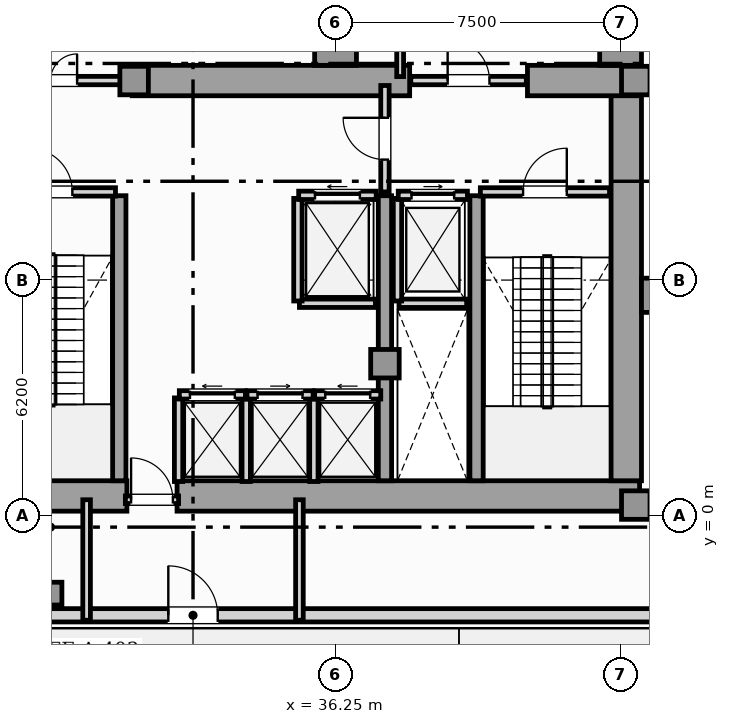
"""IFC4 building model, lengths in metres.
Left out: names, types, materials, properties, quantities, classifications, styles, units other than length and angle.
Written with IfcOpenShell. Run it as: python <this file> out.ifc"""

import sys

from ifc_helpers import new_model, si_unit, direction, frame, frame_2d, origin, origin_2d, place, context, subcontext, project, spatial, rectangle, hollow_rectangle, extrude, element, fill, save


model = new_model("IFC4")
c1 = context("Model", 3, precision=1e-05, world=origin(), true_north=direction((0.0, 1.0)))
c2 = subcontext(c1, "Body", "Model", "MODEL_VIEW")
j1 = project(units=[si_unit("LENGTHUNIT", "METRE"), si_unit("PLANEANGLEUNIT", "RADIAN")], contexts=[c1])
p1 = place(None, origin())
s1 = spatial("IfcSite", under=j1, at=p1, CompositionType="ELEMENT")
p2 = place(p1, origin())
s2 = spatial("IfcBuilding", under=s1, at=p2, CompositionType="ELEMENT")
p3 = place(p2, origin())
s3 = spatial("IfcBuildingStorey", under=s2, at=p3, CompositionType="ELEMENT", Elevation=0.0)
p4 = place(p3, frame((13.25, 0.52, 0.0), z_axis=(0.0, 0.0, 1.0), x_axis=(1.0, 0.0, 0.0)))
e1 = element("IfcWall", 1, at=p4, inside=s3, PredefinedType="SHEAR", context=c2, shape_type="SweptSolid", body=[
    extrude(rectangle(XDim=17.51, YDim=0.8, at=frame_2d((8.755, 0.0))), origin(), (0.0, 0.0, 1.0), 5.1),
])
p5 = place(p3, frame((32.08, 0.52, 0.0), z_axis=(0.0, 0.0, 1.0), x_axis=(1.0, 0.0, 0.0)))
e2 = element("IfcWall", 2, at=p5, inside=s3, PredefinedType="SHEAR", context=c2, shape_type="SweptSolid", body=[
    extrude(rectangle(XDim=12.17, YDim=0.8, at=frame_2d((6.085, 0.0))), origin(), (0.0, 0.0, 1.0), 5.1),
])
p6 = place(p3, frame((43.9, 0.92, 0.0), z_axis=(0.0, 0.0, 1.0), x_axis=(0.0, 1.0, 0.0)))
e3 = element("IfcWall", 3, at=p6, inside=s3, PredefinedType="SHEAR", context=c2, shape_type="SweptSolid", body=[
    extrude(rectangle(XDim=10.53, YDim=0.8, at=frame_2d((5.265, 0.0))), origin(), (0.0, 0.0, 1.0), 5.1),
])
p7 = place(p3, frame((30.9, 11.45, 0.0), z_axis=(0.0, 0.0, 1.0), x_axis=(1.0, 0.0, 0.0)))
e4 = element("IfcWall", 4, at=p7, inside=s3, PredefinedType="SHEAR", context=c2, shape_type="SweptSolid", body=[
    extrude(rectangle(XDim=7.3, YDim=0.8, at=frame_2d((3.65, 0.0))), origin(), (0.0, 0.0, 1.0), 5.1),
])
p8 = place(p3, frame((41.3, 11.45, 0.0), z_axis=(0.0, 0.0, 1.0), x_axis=(1.0, 0.0, 0.0)))
e5 = element("IfcWall", 5, at=p8, inside=s3, PredefinedType="SHEAR", context=c2, shape_type="SweptSolid", body=[
    extrude(rectangle(XDim=2.95, YDim=0.8, at=frame_2d((1.475, 0.0))), origin(), (0.0, 0.0, 1.0), 5.1),
])
for number, where, z_axis, x_axis in (
    (6, (30.56, 0.92, 0.0), (0.0, 0.0, 1.0), (0.0, 1.0, 0.0)),
    (7, (37.55, 0.92, 0.0), (0.0, 0.0, 1.0), (0.0, 1.0, 0.0)),
    (8, (39.96, 0.92, 0.0), (0.0, 0.0, 1.0), (0.0, 1.0, 0.0)),
):
    element("IfcWall", number, at=place(p3, frame(where, z_axis=z_axis, x_axis=x_axis)), inside=s3, PredefinedType="SHEAR", context=c2, shape_type="SweptSolid", body=[
        extrude(rectangle(XDim=7.5, YDim=0.35, at=frame_2d((3.75, 0.0))), origin(), (0.0, 0.0, 1.0), 5.1),
    ])
p9 = place(p3, frame((44.6, 5.8, 0.0), z_axis=(0.0, 0.0, 1.0), x_axis=(1.0, 0.0, 0.0)))
e9 = element("IfcColumn", 9, at=p9, inside=s3, PredefinedType="PILASTER", context=c2, shape_type="SweptSolid", body=[
    extrude(rectangle(XDim=0.6, YDim=0.9, at=origin_2d()), origin(), (0.0, 0.0, 1.0), 5.4),
])
for number, where, z_axis, x_axis in (
    (10, (44.15, 0.28, 0.0), (0.0, 0.0, 1.0), (1.0, 0.0, 0.0)),
    (11, (44.15, 11.45, 0.0), (0.0, 0.0, 1.0), (1.0, 0.0, 0.0)),
    (12, (37.55, 4.0, 0.0), (0.0, 0.0, 1.0), (1.0, 0.0, 0.0)),
    (13, (30.95, 11.45, 0.0), (0.0, 0.0, 1.0), (1.0, 0.0, 0.0)),
):
    element("IfcColumn", number, at=place(p3, frame(where, z_axis=z_axis, x_axis=x_axis)), inside=s3, PredefinedType="COLUMN", context=c2, shape_type="SweptSolid", body=[
        extrude(rectangle(XDim=0.75, YDim=0.75, at=origin_2d()), origin(), (0.0, 0.0, 1.0), 5.4),
    ])
for number, where, z_axis, x_axis in (
    (14, (43.75, 12.4, 0.0), (0.0, 0.0, 1.0), (1.0, 0.0, 0.0)),
    (15, (36.25, 12.4, 0.0), (0.0, 0.0, 1.0), (1.0, 0.0, 0.0)),
):
    element("IfcColumn", number, at=place(p3, frame(where, z_axis=z_axis, x_axis=x_axis)), inside=s3, PredefinedType="COLUMN", context=c2, shape_type="SweptSolid", body=[
        extrude(rectangle(XDim=1.1, YDim=1.1, at=origin_2d()), origin(), (0.0, 0.0, 1.0), 5.4),
    ])
p10 = place(p3, frame((28.75, -2.05, 0.0), z_axis=(0.0, 0.0, 1.0), x_axis=(1.0, 0.0, 0.0)))
e16 = element("IfcColumn", 16, at=p10, inside=s3, PredefinedType="COLUMN", context=c2, shape_type="SweptSolid", body=[
    extrude(hollow_rectangle(XDim=0.6, YDim=0.6, WallThickness=0.04, at=origin_2d()), origin(), (0.0, 0.0, 1.0), 5.4),
])
p11 = place(p3, frame((-8.06, -2.62, 0.0), z_axis=(0.0, 0.0, 1.0), x_axis=(1.0, 0.0, 0.0)))
e17 = element("IfcWall", 17, at=p11, inside=s3, PredefinedType="SOLIDWALL", context=c2, shape_type="SweptSolid", body=[
    extrude(rectangle(XDim=71.97, YDim=0.35, at=frame_2d((35.985, 0.0))), origin(), (0.0, 0.0, 1.0), 5.1),
])
p12 = place(p11, frame((18.06, 0.0, 0.0)))
e18 = element("IfcOpeningElement", 18, at=p12, cuts=e17, PredefinedType="OPENING", context=c2, shape_type="SweptSolid", body=[
    extrude(rectangle(XDim=1.3, YDim=2.2, at=frame_2d((0.65, 1.1))), frame((0.0, 0.185, 0.0), z_axis=(0.0, -1.0, 0.0), x_axis=(1.0, 0.0, 0.0)), (0.0, 0.0, 1.0), 0.37),
])
p13 = place(p11, frame((39.91, 0.0, 0.0)))
e19 = element("IfcOpeningElement", 19, at=p13, cuts=e17, PredefinedType="OPENING", context=c2, shape_type="SweptSolid", body=[
    extrude(rectangle(XDim=1.3, YDim=2.2, at=frame_2d((0.65, 1.1))), frame((0.0, 0.185, 0.0), z_axis=(0.0, -1.0, 0.0), x_axis=(1.0, 0.0, 0.0)), (0.0, 0.0, 1.0), 0.37),
])
p14 = place(p11, frame((54.26, 0.0, 0.0)))
e20 = element("IfcOpeningElement", 20, at=p14, cuts=e17, PredefinedType="OPENING", context=c2, shape_type="SweptSolid", body=[
    extrude(rectangle(XDim=1.3, YDim=2.2, at=frame_2d((0.65, 1.1))), frame((0.0, 0.185, 0.0), z_axis=(0.0, -1.0, 0.0), x_axis=(1.0, 0.0, 0.0)), (0.0, 0.0, 1.0), 0.37),
])
p15 = place(p11, frame((66.76, 0.0, 0.0)))
e21 = element("IfcOpeningElement", 21, at=p15, cuts=e17, PredefinedType="OPENING", context=c2, shape_type="SweptSolid", body=[
    extrude(rectangle(XDim=3.6, YDim=3.2, at=frame_2d((1.8, 1.6))), frame((0.0, 0.185, 0.0), z_axis=(0.0, -1.0, 0.0), x_axis=(1.0, 0.0, 0.0)), (0.0, 0.0, 1.0), 0.37),
])
p16 = place(p11, frame((64.92, 0.0, 0.0)))
e22 = element("IfcOpeningElement", 22, at=p16, cuts=e17, PredefinedType="OPENING", context=c2, shape_type="SweptSolid", body=[
    extrude(rectangle(XDim=1.08, YDim=2.25, at=frame_2d((0.54, 1.125))), frame((0.0, 0.185, 0.0), z_axis=(0.0, -1.0, 0.0), x_axis=(1.0, 0.0, 0.0)), (0.0, 0.0, 1.0), 0.37),
])
p17 = place(p3, frame((37.92, 5.59, 0.0), z_axis=(0.0, 0.0, 1.0), x_axis=(1.0, 0.0, 0.0)))
e23 = element("IfcWall", 23, at=p17, inside=s3, PredefinedType="SOLIDWALL", context=c2, shape_type="SweptSolid", body=[
    extrude(rectangle(XDim=1.78, YDim=0.22, at=frame_2d((0.89, 0.0))), origin(), (0.0, 0.0, 1.0), 5.1),
])
p18 = place(p3, frame((37.88, 5.65, 0.0), z_axis=(0.0, 0.0, 1.0), x_axis=(0.0, 1.0, 0.0)))
e24 = element("IfcWall", 24, at=p18, inside=s3, PredefinedType="SOLIDWALL", context=c2, shape_type="SweptSolid", body=[
    extrude(rectangle(XDim=2.7, YDim=0.22, at=frame_2d((1.35, 0.0))), origin(), (0.0, 0.0, 1.0), 5.1),
])
p19 = place(p3, frame((37.9, 8.43, 0.0), z_axis=(0.0, 0.0, 1.0), x_axis=(1.0, 0.0, 0.0)))
e25 = element("IfcWall", 25, at=p19, inside=s3, PredefinedType="SOLIDWALL", context=c2, shape_type="SweptSolid", body=[
    extrude(rectangle(XDim=1.82, YDim=0.22, at=frame_2d((0.91, 0.0))), origin(), (0.0, 0.0, 1.0), 5.1),
])
p20 = place(p19, frame((0.35, 0.0, 0.0)))
e26 = element("IfcOpeningElement", 26, at=p20, cuts=e25, PredefinedType="OPENING", context=c2, shape_type="SweptSolid", body=[
    extrude(rectangle(XDim=1.12, YDim=2.25, at=frame_2d((0.56, 1.125))), frame((0.0, 0.12, 0.0), z_axis=(0.0, -1.0, 0.0), x_axis=(1.0, 0.0, 0.0)), (0.0, 0.0, 1.0), 0.24),
])
p21 = place(p3, frame((35.3, 5.59, 0.0), z_axis=(0.0, 0.0, 1.0), x_axis=(1.0, 0.0, 0.0)))
e27 = element("IfcWall", 27, at=p21, inside=s3, PredefinedType="SOLIDWALL", context=c2, shape_type="SweptSolid", body=[
    extrude(rectangle(XDim=2.0, YDim=0.22, at=frame_2d((1.0, 0.0))), origin(), (0.0, 0.0, 1.0), 5.1),
])
p22 = place(p3, frame((35.26, 5.65, 0.0), z_axis=(0.0, 0.0, 1.0), x_axis=(0.0, 1.0, 0.0)))
e28 = element("IfcWall", 28, at=p22, inside=s3, PredefinedType="SOLIDWALL", context=c2, shape_type="SweptSolid", body=[
    extrude(rectangle(XDim=2.7, YDim=0.22, at=frame_2d((1.35, 0.0))), origin(), (0.0, 0.0, 1.0), 5.1),
])
p23 = place(p3, frame((35.28, 8.43, 0.0), z_axis=(0.0, 0.0, 1.0), x_axis=(1.0, 0.0, 0.0)))
e29 = element("IfcWall", 29, at=p23, inside=s3, PredefinedType="SOLIDWALL", context=c2, shape_type="SweptSolid", body=[
    extrude(rectangle(XDim=2.04, YDim=0.22, at=frame_2d((1.02, 0.0))), origin(), (0.0, 0.0, 1.0), 5.1),
])
p24 = place(p23, frame((0.43, 0.0, 0.0)))
e30 = element("IfcOpeningElement", 30, at=p24, cuts=e29, PredefinedType="OPENING", context=c2, shape_type="SweptSolid", body=[
    extrude(rectangle(XDim=1.18, YDim=2.2, at=frame_2d((0.59, 1.1))), frame((0.0, 0.12, 0.0), z_axis=(0.0, -1.0, 0.0), x_axis=(1.0, 0.0, 0.0)), (0.0, 0.0, 1.0), 0.24),
])
for number, where, z_axis, x_axis in (
    (31, (32.12, 0.9, 0.0), (0.0, 0.0, 1.0), (0.0, 1.0, 0.0)),
    (32, (33.9, 0.9, 0.0), (0.0, 0.0, 1.0), (0.0, 1.0, 0.0)),
):
    element("IfcWall", number, at=place(p3, frame(where, z_axis=z_axis, x_axis=x_axis)), inside=s3, PredefinedType="SOLIDWALL", context=c2, shape_type="SweptSolid", body=[
        extrude(rectangle(XDim=2.2, YDim=0.22, at=frame_2d((1.1, 0.0))), origin(), (0.0, 0.0, 1.0), 5.1),
    ])
p25 = place(p3, frame((32.14, 3.18, 0.0), z_axis=(0.0, 0.0, 1.0), x_axis=(1.0, 0.0, 0.0)))
e33 = element("IfcWall", 33, at=p25, inside=s3, PredefinedType="SOLIDWALL", context=c2, shape_type="SweptSolid", body=[
    extrude(rectangle(XDim=1.74, YDim=0.22, at=frame_2d((0.87, 0.0))), origin(), (0.0, 0.0, 1.0), 5.1),
])
p26 = place(p25, frame((0.28, 0.0, 0.0)))
e34 = element("IfcOpeningElement", 34, at=p26, cuts=e33, PredefinedType="OPENING", context=c2, shape_type="SweptSolid", body=[
    extrude(rectangle(XDim=1.18, YDim=2.2, at=frame_2d((0.59, 1.1))), frame((0.0, 0.12, 0.0), z_axis=(0.0, -1.0, 0.0), x_axis=(1.0, 0.0, 0.0)), (0.0, 0.0, 1.0), 0.24),
])
p27 = place(p3, frame((35.68, 0.9, 0.0), z_axis=(0.0, 0.0, 1.0), x_axis=(0.0, 1.0, 0.0)))
e35 = element("IfcWall", 35, at=p27, inside=s3, PredefinedType="SOLIDWALL", context=c2, shape_type="SweptSolid", body=[
    extrude(rectangle(XDim=2.2, YDim=0.22, at=frame_2d((1.1, 0.0))), origin(), (0.0, 0.0, 1.0), 5.1),
])
p28 = place(p3, frame((33.92, 3.18, 0.0), z_axis=(0.0, 0.0, 1.0), x_axis=(1.0, 0.0, 0.0)))
e36 = element("IfcWall", 36, at=p28, inside=s3, PredefinedType="SOLIDWALL", context=c2, shape_type="SweptSolid", body=[
    extrude(rectangle(XDim=1.74, YDim=0.22, at=frame_2d((0.87, 0.0))), origin(), (0.0, 0.0, 1.0), 5.1),
])
p29 = place(p28, frame((0.28, 0.0, 0.0)))
e37 = element("IfcOpeningElement", 37, at=p29, cuts=e36, PredefinedType="OPENING", context=c2, shape_type="SweptSolid", body=[
    extrude(rectangle(XDim=1.18, YDim=2.2, at=frame_2d((0.59, 1.1))), frame((0.0, 0.12, 0.0), z_axis=(0.0, -1.0, 0.0), x_axis=(1.0, 0.0, 0.0)), (0.0, 0.0, 1.0), 0.24),
])
p30 = place(p3, frame((35.7, 3.18, 0.0), z_axis=(0.0, 0.0, 1.0), x_axis=(1.0, 0.0, 0.0)))
e38 = element("IfcWall", 38, at=p30, inside=s3, PredefinedType="SOLIDWALL", context=c2, shape_type="SweptSolid", body=[
    extrude(rectangle(XDim=1.74, YDim=0.22, at=frame_2d((0.87, 0.0))), origin(), (0.0, 0.0, 1.0), 5.1),
])
p31 = place(p30, frame((0.28, 0.0, 0.0)))
e39 = element("IfcOpeningElement", 39, at=p31, cuts=e38, PredefinedType="OPENING", context=c2, shape_type="SweptSolid", body=[
    extrude(rectangle(XDim=1.18, YDim=2.2, at=frame_2d((0.59, 1.1))), frame((0.0, 0.12, 0.0), z_axis=(0.0, -1.0, 0.0), x_axis=(1.0, 0.0, 0.0)), (0.0, 0.0, 1.0), 0.24),
])
p32 = place(p3, frame((30.72, 0.42, 0.0), z_axis=(0.0, 0.0, 1.0), x_axis=(1.0, 0.0, 0.0)))
e40 = element("IfcWall", 40, at=p32, inside=s3, PredefinedType="PARTITIONING", context=c2, shape_type="SweptSolid", body=[
    extrude(rectangle(XDim=1.4, YDim=0.2, at=frame_2d((0.7, 0.0))), origin(), (0.0, 0.0, 1.0), 4.555),
])
p33 = place(p32, frame((0.15, 0.0, 0.0)))
e41 = element("IfcOpeningElement", 41, at=p33, cuts=e40, PredefinedType="OPENING", context=c2, shape_type="SweptSolid", body=[
    extrude(rectangle(XDim=1.1, YDim=2.2, at=frame_2d((0.55, 1.1))), frame((0.0, 0.11, 0.0), z_axis=(0.0, -1.0, 0.0), x_axis=(1.0, 0.0, 0.0)), (0.0, 0.0, 1.0), 0.22),
])
for number, where, z_axis, x_axis in (
    (42, (29.7, -2.75, 0.0), (0.0, 0.0, 1.0), (0.0, 1.0, 0.0)),
    (43, (35.3, -2.75, 0.0), (0.0, 0.0, 1.0), (0.0, 1.0, 0.0)),
):
    element("IfcWall", number, at=place(p3, frame(where, z_axis=z_axis, x_axis=x_axis)), inside=s3, PredefinedType="PARTITIONING", context=c2, shape_type="SweptSolid", body=[
        extrude(rectangle(XDim=3.17, YDim=0.2, at=frame_2d((1.585, 0.0))), origin(), (0.0, 0.0, 1.0), 5.1),
    ])
p34 = place(p3, frame((40.06, 8.52, 0.0), z_axis=(0.0, 0.0, 1.0), x_axis=(1.0, 0.0, 0.0)))
e44 = element("IfcWall", 44, at=p34, inside=s3, PredefinedType="SOLIDWALL", context=c2, shape_type="SweptSolid", body=[
    extrude(rectangle(XDim=3.4, YDim=0.22, at=frame_2d((1.7, 0.0))), origin(), (0.0, 0.0, 1.0), 5.1),
])
p35 = place(p34, frame((1.125, 0.0, 0.0)))
e45 = element("IfcOpeningElement", 45, at=p35, cuts=e44, PredefinedType="OPENING", context=c2, shape_type="SweptSolid", body=[
    extrude(rectangle(XDim=1.15, YDim=2.2, at=frame_2d((0.575, 1.1))), frame((0.0, 0.12, 0.0), z_axis=(0.0, -1.0, 0.0), x_axis=(1.0, 0.0, 0.0)), (0.0, 0.0, 1.0), 0.24),
])
p36 = place(p3, frame((27.04, 8.52, 0.0), z_axis=(0.0, 0.0, 1.0), x_axis=(1.0, 0.0, 0.0)))
e46 = element("IfcWall", 46, at=p36, inside=s3, PredefinedType="SOLIDWALL", context=c2, shape_type="SweptSolid", body=[
    extrude(rectangle(XDim=3.42, YDim=0.22, at=frame_2d((1.71, 0.0))), origin(), (0.0, 0.0, 1.0), 5.1),
])
p37 = place(p36, frame((1.135, 0.0, 0.0)))
e47 = element("IfcOpeningElement", 47, at=p37, cuts=e46, PredefinedType="OPENING", context=c2, shape_type="SweptSolid", body=[
    extrude(rectangle(XDim=1.15, YDim=2.2, at=frame_2d((0.575, 1.1))), frame((0.0, 0.12, 0.0), z_axis=(0.0, -1.0, 0.0), x_axis=(1.0, 0.0, 0.0)), (0.0, 0.0, 1.0), 0.24),
])
p38 = place(p3, frame((37.55, 8.52, 0.0), z_axis=(0.0, 0.0, 1.0), x_axis=(0.0, 1.0, 0.0)))
e48 = element("IfcWall", 48, at=p38, inside=s3, PredefinedType="SOLIDWALL", context=c2, shape_type="SweptSolid", body=[
    extrude(rectangle(XDim=2.8, YDim=0.22, at=frame_2d((1.4, 0.0))), origin(), (0.0, 0.0, 1.0), 4.555),
])
p39 = place(p38, frame((0.85, 0.0, 0.0)))
e49 = element("IfcOpeningElement", 49, at=p39, cuts=e48, PredefinedType="OPENING", context=c2, shape_type="SweptSolid", body=[
    extrude(rectangle(XDim=1.1, YDim=2.2, at=frame_2d((0.55, 1.1))), frame((0.0, 0.12, 0.0), z_axis=(0.0, -1.0, 0.0), x_axis=(1.0, 0.0, 0.0)), (0.0, 0.0, 1.0), 0.24),
])
p40 = place(p3, frame((26.63, 11.45, 0.0), z_axis=(0.0, 0.0, 1.0), x_axis=(1.0, 0.0, 0.0)))
e50 = element("IfcWall", 50, at=p40, inside=s3, PredefinedType="SOLIDWALL", context=c2, shape_type="SweptSolid", body=[
    extrude(rectangle(XDim=4.24, YDim=0.22, at=frame_2d((2.12, 0.0))), origin(), (0.0, 0.0, 1.0), 5.1),
])
p41 = place(p40, frame((1.42, 0.0, 0.0)))
e51 = element("IfcOpeningElement", 51, at=p41, cuts=e50, PredefinedType="OPENING", context=c2, shape_type="SweptSolid", body=[
    extrude(rectangle(XDim=1.4, YDim=2.2, at=frame_2d((0.7, 1.1))), frame((0.0, 0.12, 0.0), z_axis=(0.0, -1.0, 0.0), x_axis=(1.0, 0.0, 0.0)), (0.0, 0.0, 1.0), 0.24),
])
p42 = place(p3, frame((38.23, 11.45, 0.0), z_axis=(0.0, 0.0, 1.0), x_axis=(1.0, 0.0, 0.0)))
e52 = element("IfcWall", 52, at=p42, inside=s3, PredefinedType="SOLIDWALL", context=c2, shape_type="SweptSolid", body=[
    extrude(rectangle(XDim=3.04, YDim=0.22, at=frame_2d((1.52, 0.0))), origin(), (0.0, 0.0, 1.0), 5.1),
])
p43 = place(p42, frame((0.97, 0.0, 0.0)))
e53 = element("IfcOpeningElement", 53, at=p43, cuts=e52, PredefinedType="OPENING", context=c2, shape_type="SweptSolid", body=[
    extrude(rectangle(XDim=1.1, YDim=2.2, at=frame_2d((0.55, 1.1))), frame((0.0, 0.12, 0.0), z_axis=(0.0, -1.0, 0.0), x_axis=(1.0, 0.0, 0.0)), (0.0, 0.0, 1.0), 0.24),
])
p44 = place(p3, frame((37.95, 11.555, 0.0), z_axis=(0.0, 0.0, 1.0), x_axis=(0.0, 1.0, 0.0)))
e54 = element("IfcWall", 54, at=p44, inside=s3, PredefinedType="PARTITIONING", context=c2, shape_type="SweptSolid", body=[
    extrude(rectangle(XDim=3.39, YDim=0.18, at=frame_2d((1.695, 0.0))), origin(), (0.0, 0.0, 1.0), 5.1),
])
p45 = place(p13, frame((1.3, 0.0, 0.0), z_axis=(0.0, 0.0, 1.0), x_axis=(-1.0, 0.0, 0.0)))
e55 = element("IfcDoor", 55, at=p45, inside=s3, OperationType="SINGLE_SWING_RIGHT", PredefinedType="DOOR", context=c2, shape_type="SweptSolid", body=[
    extrude(rectangle(XDim=1.3, YDim=2.2, at=frame_2d((0.65, 1.1))), frame((0.0, 0.025, 0.0), z_axis=(0.0, -1.0, 0.0), x_axis=(1.0, 0.0, 0.0)), (0.0, 0.0, 1.0), 0.05),
])
fill(e19, e55)
p46 = place(p20, origin())
e56 = element("IfcDoor", 56, at=p46, inside=s3, OperationType="SLIDING_TO_RIGHT", PredefinedType="DOOR", context=c2, shape_type="SweptSolid", body=[
    extrude(rectangle(XDim=1.12, YDim=2.25, at=frame_2d((0.56, 1.125))), frame((0.0, 0.025, 0.0), z_axis=(0.0, -1.0, 0.0), x_axis=(1.0, 0.0, 0.0)), (0.0, 0.0, 1.0), 0.05),
])
fill(e26, e56)
p47 = place(p24, origin())
e57 = element("IfcDoor", 57, at=p47, inside=s3, OperationType="SLIDING_TO_LEFT", PredefinedType="DOOR", context=c2, shape_type="SweptSolid", body=[
    extrude(rectangle(XDim=1.18, YDim=2.2, at=frame_2d((0.59, 1.1))), frame((0.0, 0.025, 0.0), z_axis=(0.0, -1.0, 0.0), x_axis=(1.0, 0.0, 0.0)), (0.0, 0.0, 1.0), 0.05),
])
fill(e30, e57)
p48 = place(p26, origin())
e58 = element("IfcDoor", 58, at=p48, inside=s3, OperationType="SLIDING_TO_LEFT", PredefinedType="DOOR", context=c2, shape_type="SweptSolid", body=[
    extrude(rectangle(XDim=1.18, YDim=2.2, at=frame_2d((0.59, 1.1))), frame((0.0, 0.025, 0.0), z_axis=(0.0, -1.0, 0.0), x_axis=(1.0, 0.0, 0.0)), (0.0, 0.0, 1.0), 0.05),
])
fill(e34, e58)
p49 = place(p29, origin())
e59 = element("IfcDoor", 59, at=p49, inside=s3, OperationType="SLIDING_TO_RIGHT", PredefinedType="DOOR", context=c2, shape_type="SweptSolid", body=[
    extrude(rectangle(XDim=1.18, YDim=2.2, at=frame_2d((0.59, 1.1))), frame((0.0, 0.025, 0.0), z_axis=(0.0, -1.0, 0.0), x_axis=(1.0, 0.0, 0.0)), (0.0, 0.0, 1.0), 0.05),
])
fill(e37, e59)
p50 = place(p31, origin())
e60 = element("IfcDoor", 60, at=p50, inside=s3, OperationType="SLIDING_TO_LEFT", PredefinedType="DOOR", context=c2, shape_type="SweptSolid", body=[
    extrude(rectangle(XDim=1.18, YDim=2.2, at=frame_2d((0.59, 1.1))), frame((0.0, 0.025, 0.0), z_axis=(0.0, -1.0, 0.0), x_axis=(1.0, 0.0, 0.0)), (0.0, 0.0, 1.0), 0.05),
])
fill(e39, e60)
p51 = place(p33, origin())
e61 = element("IfcDoor", 61, at=p51, inside=s3, OperationType="SINGLE_SWING_LEFT", PredefinedType="DOOR", context=c2, shape_type="SweptSolid", body=[
    extrude(rectangle(XDim=1.1, YDim=2.2, at=frame_2d((0.55, 1.1))), frame((0.0, 0.025, 0.0), z_axis=(0.0, -1.0, 0.0), x_axis=(1.0, 0.0, 0.0)), (0.0, 0.0, 1.0), 0.05),
])
fill(e41, e61)
p52 = place(p35, origin())
e62 = element("IfcDoor", 62, at=p52, inside=s3, OperationType="SINGLE_SWING_RIGHT", PredefinedType="DOOR", context=c2, shape_type="SweptSolid", body=[
    extrude(rectangle(XDim=1.15, YDim=2.2, at=frame_2d((0.575, 1.1))), frame((0.0, 0.025, 0.0), z_axis=(0.0, -1.0, 0.0), x_axis=(1.0, 0.0, 0.0)), (0.0, 0.0, 1.0), 0.05),
])
fill(e45, e62)
p53 = place(p37, origin())
e63 = element("IfcDoor", 63, at=p53, inside=s3, OperationType="SINGLE_SWING_LEFT", PredefinedType="DOOR", context=c2, shape_type="SweptSolid", body=[
    extrude(rectangle(XDim=1.15, YDim=2.2, at=frame_2d((0.575, 1.1))), frame((0.0, 0.025, 0.0), z_axis=(0.0, -1.0, 0.0), x_axis=(1.0, 0.0, 0.0)), (0.0, 0.0, 1.0), 0.05),
])
fill(e47, e63)
p54 = place(p39, origin())
e64 = element("IfcDoor", 64, at=p54, inside=s3, OperationType="SINGLE_SWING_RIGHT", PredefinedType="DOOR", context=c2, shape_type="SweptSolid", body=[
    extrude(rectangle(XDim=1.1, YDim=2.2, at=frame_2d((0.55, 1.1))), frame((0.0, 0.025, 0.0), z_axis=(0.0, -1.0, 0.0), x_axis=(1.0, 0.0, 0.0)), (0.0, 0.0, 1.0), 0.05),
])
fill(e49, e64)
p55 = place(p41, origin())
e65 = element("IfcDoor", 65, at=p55, inside=s3, OperationType="DOUBLE_DOOR_SINGLE_SWING", PredefinedType="DOOR", context=c2, shape_type="SweptSolid", body=[
    extrude(rectangle(XDim=1.4, YDim=2.2, at=frame_2d((0.7, 1.1))), frame((0.0, 0.025, 0.0), z_axis=(0.0, -1.0, 0.0), x_axis=(1.0, 0.0, 0.0)), (0.0, 0.0, 1.0), 0.05),
])
fill(e51, e65)
p56 = place(p43, origin())
e66 = element("IfcDoor", 66, at=p56, inside=s3, OperationType="SINGLE_SWING_LEFT", PredefinedType="DOOR", context=c2, shape_type="SweptSolid", body=[
    extrude(rectangle(XDim=1.1, YDim=2.2, at=frame_2d((0.55, 1.1))), frame((0.0, 0.025, 0.0), z_axis=(0.0, -1.0, 0.0), x_axis=(1.0, 0.0, 0.0)), (0.0, 0.0, 1.0), 0.05),
])
fill(e53, e66)
save(model, sys.argv[1])
